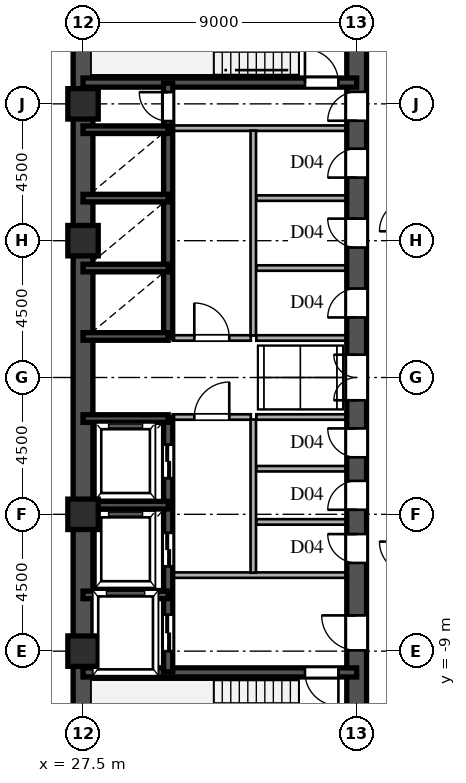
"""IFC4 building model, lengths in metres.
Left out: names, types, materials, properties, quantities, classifications, styles, units other than length and angle.
Written with IfcOpenShell. Run it as: python <this file> out.ifc"""

import sys

from ifc_helpers import new_model, si_unit, direction, frame, frame_2d, origin, origin_2d, place, context, subcontext, project, spatial, rectangle, hollow_rectangle, extrude, source, transform, mapped, element, fill, save


model = new_model("IFC4")
c1 = context("Model", 3, precision=1e-05, world=origin(), true_north=direction((0.0, 1.0)))
c2 = subcontext(c1, "Body", "Model", "MODEL_VIEW")
j1 = project(units=[si_unit("LENGTHUNIT", "METRE"), si_unit("PLANEANGLEUNIT", "RADIAN")], contexts=[c1])
p1 = place(None, origin())
s1 = spatial("IfcSite", under=j1, at=p1, CompositionType="ELEMENT")
p2 = place(p1, origin())
s2 = spatial("IfcBuilding", under=s1, at=p2, CompositionType="ELEMENT")
p3 = place(p2, frame((0.0, 0.0, 80.1)))
s3 = spatial("IfcBuildingStorey", under=s2, at=p3, CompositionType="ELEMENT", Elevation=80.1)
m1 = source(origin(), c2, "Body", "SweptSolid", [
    extrude(hollow_rectangle(XDim=1.0, YDim=1.0, WallThickness=0.042, at=origin_2d()), origin(), (0.0, 0.0, 1.0), 3.6),
])
for number, where, z_axis, x_axis in (
    (1, (27.5, -9.0, 0.0), (0.0, 0.0, 1.0), (1.0, 0.0, 0.0)),
    (2, (27.5, -4.5, 0.0), (0.0, 0.0, 1.0), (1.0, 0.0, 0.0)),
    (3, (27.5, 4.5, 0.0), (0.0, 0.0, 1.0), (1.0, 0.0, 0.0)),
    (4, (27.5, 9.0, 0.0), (0.0, 0.0, 1.0), (1.0, 0.0, 0.0)),
):
    element("IfcColumn", number, at=place(p3, frame(where, z_axis=z_axis, x_axis=x_axis)), inside=s3, PredefinedType="COLUMN", context=c2, shape_type="MappedRepresentation", body=[
        mapped(m1, transform((0.0, 0.0, 0.0), scale=1.0)),
    ])
for number, where, z_axis, x_axis in (
    (5, (27.5, -13.5, 0.0), (0.0, 0.0, 1.0), (0.0, 1.0, 0.0)),
    (6, (27.5, 1.3, 0.0), (0.0, 0.0, 1.0), (0.0, 1.0, 0.0)),
):
    element("IfcWall", number, at=place(p3, frame(where, z_axis=z_axis, x_axis=x_axis)), inside=s3, PredefinedType="SHEAR", context=c2, shape_type="SweptSolid", body=[
        extrude(rectangle(XDim=12.2, YDim=0.65, at=frame_2d((6.1, 0.0))), origin(), (0.0, 0.0, 1.0), 3.38),
    ])
p4 = place(p3, frame((27.5, -1.3, 0.0), z_axis=(0.0, 0.0, 1.0), x_axis=(0.0, 1.0, 0.0)))
e7 = element("IfcWall", 7, at=p4, inside=s3, PredefinedType="SHEAR", context=c2, shape_type="SweptSolid", body=[
    extrude(rectangle(XDim=2.6, YDim=0.65, at=frame_2d((1.3, 0.0))), origin(), (0.0, 0.0, 1.0), 3.38),
])
p5 = place(p3, frame((36.5, -13.65, 0.0), z_axis=(0.0, 0.0, 1.0), x_axis=(0.0, 1.0, 0.0)))
e8 = element("IfcWall", 8, at=p5, inside=s3, PredefinedType="SHEAR", context=c2, shape_type="SweptSolid", body=[
    extrude(rectangle(XDim=7.15, YDim=0.65, at=frame_2d((3.575, 0.0))), origin(), (0.0, 0.0, 1.0), 3.38),
])
p6 = place(p5, frame((4.675, 0.0, 0.0)))
e9 = element("IfcOpeningElement", 9, at=p6, cuts=e8, PredefinedType="OPENING", context=c2, shape_type="SweptSolid", body=[
    extrude(rectangle(XDim=1.15, YDim=2.2, at=frame_2d((0.575, 1.1))), frame((0.0, 0.335, 0.0), z_axis=(0.0, -1.0, 0.0), x_axis=(1.0, 0.0, 0.0)), (0.0, 0.0, 1.0), 0.67),
])
p7 = place(p3, frame((36.5, -1.3, 0.0), z_axis=(0.0, 0.0, 1.0), x_axis=(0.0, 1.0, 0.0)))
e10 = element("IfcWall", 10, at=p7, inside=s3, PredefinedType="SHEAR", context=c2, shape_type="SweptSolid", body=[
    extrude(rectangle(XDim=2.6, YDim=0.65, at=frame_2d((1.3, 0.0))), origin(), (0.0, 0.0, 1.0), 3.38),
])
p8 = place(p7, frame((0.55, 0.0, 0.0)))
e11 = element("IfcOpeningElement", 11, at=p8, cuts=e10, PredefinedType="OPENING", context=c2, shape_type="SweptSolid", body=[
    extrude(rectangle(XDim=1.5, YDim=2.3, at=frame_2d((0.75, 1.15))), frame((0.0, 0.335, 0.0), z_axis=(0.0, -1.0, 0.0), x_axis=(1.0, 0.0, 0.0)), (0.0, 0.0, 1.0), 0.67),
])
p9 = place(p3, frame((36.5, 8.2, 0.0), z_axis=(0.0, 0.0, 1.0), x_axis=(0.0, 1.0, 0.0)))
e12 = element("IfcWall", 12, at=p9, inside=s3, PredefinedType="SHEAR", context=c2, shape_type="SweptSolid", body=[
    extrude(rectangle(XDim=5.45, YDim=0.65, at=frame_2d((2.725, 0.0))), origin(), (0.0, 0.0, 1.0), 3.38),
])
p10 = place(p9, frame((0.245, 0.0, 0.0)))
e13 = element("IfcOpeningElement", 13, at=p10, cuts=e12, PredefinedType="OPENING", context=c2, shape_type="SweptSolid", body=[
    extrude(rectangle(XDim=0.95, YDim=2.15, at=frame_2d((0.475, 1.075))), frame((0.0, 0.335, 0.0), z_axis=(0.0, -1.0, 0.0), x_axis=(1.0, 0.0, 0.0)), (0.0, 0.0, 1.0), 0.67),
])
p11 = place(p3, frame((36.5, -6.5, 0.0), z_axis=(0.0, 0.0, 1.0), x_axis=(0.0, 1.0, 0.0)))
e14 = element("IfcWall", 14, at=p11, inside=s3, PredefinedType="SHEAR", context=c2, shape_type="SweptSolid", body=[
    extrude(rectangle(XDim=1.75, YDim=0.65, at=frame_2d((0.875, 0.0))), origin(), (0.0, 0.0, 1.0), 3.38),
])
p12 = place(p11, frame((0.4, 0.0, 0.0)))
e15 = element("IfcOpeningElement", 15, at=p12, cuts=e14, PredefinedType="OPENING", context=c2, shape_type="SweptSolid", body=[
    extrude(rectangle(XDim=0.95, YDim=2.15, at=frame_2d((0.475, 1.075))), frame((0.0, 0.335, 0.0), z_axis=(0.0, -1.0, 0.0), x_axis=(1.0, 0.0, 0.0)), (0.0, 0.0, 1.0), 0.67),
])
p13 = place(p3, frame((36.5, -4.75, 0.0), z_axis=(0.0, 0.0, 1.0), x_axis=(0.0, 1.0, 0.0)))
e16 = element("IfcWall", 16, at=p13, inside=s3, PredefinedType="SHEAR", context=c2, shape_type="SweptSolid", body=[
    extrude(rectangle(XDim=1.75, YDim=0.65, at=frame_2d((0.875, 0.0))), origin(), (0.0, 0.0, 1.0), 3.38),
])
p14 = place(p13, frame((0.4, 0.0, 0.0)))
e17 = element("IfcOpeningElement", 17, at=p14, cuts=e16, PredefinedType="OPENING", context=c2, shape_type="SweptSolid", body=[
    extrude(rectangle(XDim=0.95, YDim=2.15, at=frame_2d((0.475, 1.075))), frame((0.0, 0.335, 0.0), z_axis=(0.0, -1.0, 0.0), x_axis=(1.0, 0.0, 0.0)), (0.0, 0.0, 1.0), 0.67),
])
p15 = place(p3, frame((36.5, -3.0, 0.0), z_axis=(0.0, 0.0, 1.0), x_axis=(0.0, 1.0, 0.0)))
e18 = element("IfcWall", 18, at=p15, inside=s3, PredefinedType="SHEAR", context=c2, shape_type="SweptSolid", body=[
    extrude(rectangle(XDim=1.7, YDim=0.65, at=frame_2d((0.85, 0.0))), origin(), (0.0, 0.0, 1.0), 3.38),
])
p16 = place(p15, frame((0.375, 0.0, 0.0)))
e19 = element("IfcOpeningElement", 19, at=p16, cuts=e18, PredefinedType="OPENING", context=c2, shape_type="SweptSolid", body=[
    extrude(rectangle(XDim=0.95, YDim=2.15, at=frame_2d((0.475, 1.075))), frame((0.0, 0.335, 0.0), z_axis=(0.0, -1.0, 0.0), x_axis=(1.0, 0.0, 0.0)), (0.0, 0.0, 1.0), 0.67),
])
p17 = place(p3, frame((36.5, 1.3, 0.0), z_axis=(0.0, 0.0, 1.0), x_axis=(0.0, 1.0, 0.0)))
e20 = element("IfcWall", 20, at=p17, inside=s3, PredefinedType="SHEAR", context=c2, shape_type="SweptSolid", body=[
    extrude(rectangle(XDim=2.3, YDim=0.65, at=frame_2d((1.15, 0.0))), origin(), (0.0, 0.0, 1.0), 3.38),
])
p18 = place(p17, frame((0.675, 0.0, 0.0)))
e21 = element("IfcOpeningElement", 21, at=p18, cuts=e20, PredefinedType="OPENING", context=c2, shape_type="SweptSolid", body=[
    extrude(rectangle(XDim=0.95, YDim=2.15, at=frame_2d((0.475, 1.075))), frame((0.0, 0.335, 0.0), z_axis=(0.0, -1.0, 0.0), x_axis=(1.0, 0.0, 0.0)), (0.0, 0.0, 1.0), 0.67),
])
p19 = place(p3, frame((36.5, 3.6, 0.0), z_axis=(0.0, 0.0, 1.0), x_axis=(0.0, 1.0, 0.0)))
e22 = element("IfcWall", 22, at=p19, inside=s3, PredefinedType="SHEAR", context=c2, shape_type="SweptSolid", body=[
    extrude(rectangle(XDim=2.3, YDim=0.65, at=frame_2d((1.15, 0.0))), origin(), (0.0, 0.0, 1.0), 3.38),
])
p20 = place(p19, frame((0.675, 0.0, 0.0)))
e23 = element("IfcOpeningElement", 23, at=p20, cuts=e22, PredefinedType="OPENING", context=c2, shape_type="SweptSolid", body=[
    extrude(rectangle(XDim=0.95, YDim=2.15, at=frame_2d((0.475, 1.075))), frame((0.0, 0.335, 0.0), z_axis=(0.0, -1.0, 0.0), x_axis=(1.0, 0.0, 0.0)), (0.0, 0.0, 1.0), 0.67),
])
p21 = place(p3, frame((36.5, 5.9, 0.0), z_axis=(0.0, 0.0, 1.0), x_axis=(0.0, 1.0, 0.0)))
e24 = element("IfcWall", 24, at=p21, inside=s3, PredefinedType="SHEAR", context=c2, shape_type="SweptSolid", body=[
    extrude(rectangle(XDim=2.3, YDim=0.65, at=frame_2d((1.15, 0.0))), origin(), (0.0, 0.0, 1.0), 3.38),
])
p22 = place(p21, frame((0.675, 0.0, 0.0)))
e25 = element("IfcOpeningElement", 25, at=p22, cuts=e24, PredefinedType="OPENING", context=c2, shape_type="SweptSolid", body=[
    extrude(rectangle(XDim=0.95, YDim=2.15, at=frame_2d((0.475, 1.075))), frame((0.0, 0.335, 0.0), z_axis=(0.0, -1.0, 0.0), x_axis=(1.0, 0.0, 0.0)), (0.0, 0.0, 1.0), 0.67),
])
p23 = place(p3, frame((27.5, -9.7, 0.0), z_axis=(0.0, 0.0, 1.0), x_axis=(1.0, 0.0, 0.0)))
e26 = element("IfcWall", 26, at=p23, inside=s3, PredefinedType="SHEAR", context=c2, shape_type="SweptSolid", body=[
    extrude(rectangle(XDim=9.0, YDim=0.3, at=frame_2d((4.5, 0.0))), origin(), (0.0, 0.0, 1.0), 3.38),
])
p24 = place(p23, frame((7.3, 0.0, 0.0)))
e27 = element("IfcOpeningElement", 27, at=p24, cuts=e26, PredefinedType="OPENING", context=c2, shape_type="SweptSolid", body=[
    extrude(rectangle(XDim=1.1, YDim=2.2, at=frame_2d((0.55, 1.1))), frame((0.0, 0.16, 0.0), z_axis=(0.0, -1.0, 0.0), x_axis=(1.0, 0.0, 0.0)), (0.0, 0.0, 1.0), 0.32),
])
p25 = place(p3, frame((27.5, 9.7, 0.0), z_axis=(0.0, 0.0, 1.0), x_axis=(1.0, 0.0, 0.0)))
e28 = element("IfcWall", 28, at=p25, inside=s3, PredefinedType="SHEAR", context=c2, shape_type="SweptSolid", body=[
    extrude(rectangle(XDim=9.0, YDim=0.3, at=frame_2d((4.5, 0.0))), origin(), (0.0, 0.0, 1.0), 3.38),
])
p26 = place(p25, frame((7.3, 0.0, 0.0)))
e29 = element("IfcOpeningElement", 29, at=p26, cuts=e28, PredefinedType="OPENING", context=c2, shape_type="SweptSolid", body=[
    extrude(rectangle(XDim=1.1, YDim=2.2, at=frame_2d((0.55, 1.1))), frame((0.0, 0.16, 0.0), z_axis=(0.0, -1.0, 0.0), x_axis=(1.0, 0.0, 0.0)), (0.0, 0.0, 1.0), 0.32),
])
for number, where, z_axis, x_axis in (
    (30, (27.5, -7.15, 0.0), (0.0, 0.0, 1.0), (1.0, 0.0, 0.0)),
    (31, (27.5, -4.2, 0.0), (0.0, 0.0, 1.0), (1.0, 0.0, 0.0)),
    (32, (27.5, -1.35, 0.0), (0.0, 0.0, 1.0), (1.0, 0.0, 0.0)),
    (33, (27.5, 1.35, 0.0), (0.0, 0.0, 1.0), (1.0, 0.0, 0.0)),
    (34, (27.5, 3.6, 0.0), (0.0, 0.0, 1.0), (1.0, 0.0, 0.0)),
    (35, (27.5, 5.9, 0.0), (0.0, 0.0, 1.0), (1.0, 0.0, 0.0)),
    (36, (27.5, 8.15, 0.0), (0.0, 0.0, 1.0), (1.0, 0.0, 0.0)),
):
    element("IfcWall", number, at=place(p3, frame(where, z_axis=z_axis, x_axis=x_axis)), inside=s3, PredefinedType="SHEAR", context=c2, shape_type="SweptSolid", body=[
        extrude(rectangle(XDim=2.8, YDim=0.25, at=frame_2d((1.4, 0.0))), origin(), (0.0, 0.0, 1.0), 3.38),
    ])
p27 = place(p3, frame((30.3, -9.68, 0.0), z_axis=(0.0, 0.0, 1.0), x_axis=(0.0, 1.0, 0.0)))
e37 = element("IfcWall", 37, at=p27, inside=s3, PredefinedType="SHEAR", context=c2, shape_type="SweptSolid", body=[
    extrude(rectangle(XDim=2.56, YDim=0.3, at=frame_2d((1.28, 0.0))), origin(), (0.0, 0.0, 1.0), 3.38),
])
p28 = place(p27, frame((0.68, 0.0, 0.0)))
e38 = element("IfcOpeningElement", 38, at=p28, cuts=e37, PredefinedType="OPENING", context=c2, shape_type="SweptSolid", body=[
    extrude(rectangle(XDim=1.2, YDim=2.25, at=frame_2d((0.6, 1.125))), frame((0.0, 0.16, 0.0), z_axis=(0.0, -1.0, 0.0), x_axis=(1.0, 0.0, 0.0)), (0.0, 0.0, 1.0), 0.32),
])
p29 = place(p3, frame((30.3, -7.12, 0.0), z_axis=(0.0, 0.0, 1.0), x_axis=(0.0, 1.0, 0.0)))
e39 = element("IfcWall", 39, at=p29, inside=s3, PredefinedType="SHEAR", context=c2, shape_type="SweptSolid", body=[
    extrude(rectangle(XDim=2.92, YDim=0.3, at=frame_2d((1.46, 0.0))), origin(), (0.0, 0.0, 1.0), 3.38),
])
p30 = place(p29, frame((0.91, 0.0, 0.0)))
e40 = element("IfcOpeningElement", 40, at=p30, cuts=e39, PredefinedType="OPENING", context=c2, shape_type="SweptSolid", body=[
    extrude(rectangle(XDim=1.1, YDim=2.2, at=frame_2d((0.55, 1.1))), frame((0.0, 0.16, 0.0), z_axis=(0.0, -1.0, 0.0), x_axis=(1.0, 0.0, 0.0)), (0.0, 0.0, 1.0), 0.32),
])
p31 = place(p3, frame((30.3, -4.2, 0.0), z_axis=(0.0, 0.0, 1.0), x_axis=(0.0, 1.0, 0.0)))
e41 = element("IfcWall", 41, at=p31, inside=s3, PredefinedType="SHEAR", context=c2, shape_type="SweptSolid", body=[
    extrude(rectangle(XDim=2.88, YDim=0.3, at=frame_2d((1.44, 0.0))), origin(), (0.0, 0.0, 1.0), 3.38),
])
p32 = place(p31, frame((0.89, 0.0, 0.0)))
e42 = element("IfcOpeningElement", 42, at=p32, cuts=e41, PredefinedType="OPENING", context=c2, shape_type="SweptSolid", body=[
    extrude(rectangle(XDim=1.1, YDim=2.2, at=frame_2d((0.55, 1.1))), frame((0.0, 0.16, 0.0), z_axis=(0.0, -1.0, 0.0), x_axis=(1.0, 0.0, 0.0)), (0.0, 0.0, 1.0), 0.32),
])
p33 = place(p3, frame((30.3, 1.32, 0.0), z_axis=(0.0, 0.0, 1.0), x_axis=(0.0, 1.0, 0.0)))
e43 = element("IfcWall", 43, at=p33, inside=s3, PredefinedType="SHEAR", context=c2, shape_type="SweptSolid", body=[
    extrude(rectangle(XDim=2.28, YDim=0.3, at=frame_2d((1.14, 0.0))), origin(), (0.0, 0.0, 1.0), 3.38),
])
p34 = place(p3, frame((30.3, 3.6, 0.0), z_axis=(0.0, 0.0, 1.0), x_axis=(0.0, 1.0, 0.0)))
e44 = element("IfcWall", 44, at=p34, inside=s3, PredefinedType="SHEAR", context=c2, shape_type="SweptSolid", body=[
    extrude(rectangle(XDim=2.3, YDim=0.3, at=frame_2d((1.15, 0.0))), origin(), (0.0, 0.0, 1.0), 3.38),
])
p35 = place(p3, frame((30.3, 5.9, 0.0), z_axis=(0.0, 0.0, 1.0), x_axis=(0.0, 1.0, 0.0)))
e45 = element("IfcWall", 45, at=p35, inside=s3, PredefinedType="SHEAR", context=c2, shape_type="SweptSolid", body=[
    extrude(rectangle(XDim=2.25, YDim=0.3, at=frame_2d((1.125, 0.0))), origin(), (0.0, 0.0, 1.0), 3.38),
])
p36 = place(p3, frame((30.3, 8.15, 0.0), z_axis=(0.0, 0.0, 1.0), x_axis=(0.0, 1.0, 0.0)))
e46 = element("IfcWall", 46, at=p36, inside=s3, PredefinedType="SHEAR", context=c2, shape_type="SweptSolid", body=[
    extrude(rectangle(XDim=1.53, YDim=0.3, at=frame_2d((0.765, 0.0))), origin(), (0.0, 0.0, 1.0), 3.38),
])
p37 = place(p36, frame((0.285, 0.0, 0.0)))
e47 = element("IfcOpeningElement", 47, at=p37, cuts=e46, PredefinedType="OPENING", context=c2, shape_type="SweptSolid", body=[
    extrude(rectangle(XDim=0.95, YDim=2.15, at=frame_2d((0.475, 1.075))), frame((0.0, 0.16, 0.0), z_axis=(0.0, -1.0, 0.0), x_axis=(1.0, 0.0, 0.0)), (0.0, 0.0, 1.0), 0.32),
])
for number, where, z_axis, x_axis in (
    (48, (30.45, -6.5, 0.0), (0.0, 0.0, 1.0), (1.0, 0.0, 0.0)),
    (49, (30.45, 8.2, 0.0), (0.0, 0.0, 1.0), (1.0, 0.0, 0.0)),
):
    element("IfcWall", number, at=place(p3, frame(where, z_axis=z_axis, x_axis=x_axis)), inside=s3, PredefinedType="PARTITIONING", context=c2, shape_type="SweptSolid", body=[
        extrude(rectangle(XDim=5.7, YDim=0.18, at=frame_2d((2.85, 0.0))), origin(), (0.0, 0.0, 1.0), 3.38),
    ])
p38 = place(p3, frame((33.1, -6.42, 0.0), z_axis=(0.0, 0.0, 1.0), x_axis=(0.0, 1.0, 0.0)))
e50 = element("IfcWall", 50, at=p38, inside=s3, PredefinedType="PARTITIONING", context=c2, shape_type="SweptSolid", body=[
    extrude(rectangle(XDim=5.04, YDim=0.18, at=frame_2d((2.52, 0.0))), origin(), (0.0, 0.0, 1.0), 3.38),
])
p39 = place(p3, frame((33.1, 1.38, 0.0), z_axis=(0.0, 0.0, 1.0), x_axis=(0.0, 1.0, 0.0)))
e51 = element("IfcWall", 51, at=p39, inside=s3, PredefinedType="PARTITIONING", context=c2, shape_type="SweptSolid", body=[
    extrude(rectangle(XDim=6.74, YDim=0.18, at=frame_2d((3.37, 0.0))), origin(), (0.0, 0.0, 1.0), 3.38),
])
p40 = place(p3, frame((30.45, -1.3, 0.0), z_axis=(0.0, 0.0, 1.0), x_axis=(1.0, 0.0, 0.0)))
e52 = element("IfcWall", 52, at=p40, inside=s3, PredefinedType="PARTITIONING", context=c2, shape_type="SweptSolid", body=[
    extrude(rectangle(XDim=2.57, YDim=0.18, at=frame_2d((1.285, 0.0))), origin(), (0.0, 0.0, 1.0), 3.38),
])
p41 = place(p40, frame((0.71, 0.0, 0.0)))
e53 = element("IfcOpeningElement", 53, at=p41, cuts=e52, PredefinedType="OPENING", context=c2, shape_type="SweptSolid", body=[
    extrude(rectangle(XDim=1.15, YDim=2.2, at=frame_2d((0.575, 1.1))), frame((0.0, 0.1, 0.0), z_axis=(0.0, -1.0, 0.0), x_axis=(1.0, 0.0, 0.0)), (0.0, 0.0, 1.0), 0.2),
])
p42 = place(p3, frame((30.45, 1.3, 0.0), z_axis=(0.0, 0.0, 1.0), x_axis=(1.0, 0.0, 0.0)))
e54 = element("IfcWall", 54, at=p42, inside=s3, PredefinedType="PARTITIONING", context=c2, shape_type="SweptSolid", body=[
    extrude(rectangle(XDim=2.57, YDim=0.18, at=frame_2d((1.285, 0.0))), origin(), (0.0, 0.0, 1.0), 3.38),
])
p43 = place(p42, frame((0.71, 0.0, 0.0)))
e55 = element("IfcOpeningElement", 55, at=p43, cuts=e54, PredefinedType="OPENING", context=c2, shape_type="SweptSolid", body=[
    extrude(rectangle(XDim=1.15, YDim=2.2, at=frame_2d((0.575, 1.1))), frame((0.0, 0.1, 0.0), z_axis=(0.0, -1.0, 0.0), x_axis=(1.0, 0.0, 0.0)), (0.0, 0.0, 1.0), 0.2),
])
for number, where, z_axis, x_axis in (
    (56, (33.2, -1.3, 0.0), (0.0, 0.0, 1.0), (1.0, 0.0, 0.0)),
    (57, (33.2, 1.3, 0.0), (0.0, 0.0, 1.0), (1.0, 0.0, 0.0)),
    (58, (33.2, -4.75, 0.0), (0.0, 0.0, 1.0), (1.0, 0.0, 0.0)),
    (59, (33.2, -3.0, 0.0), (0.0, 0.0, 1.0), (1.0, 0.0, 0.0)),
    (60, (33.2, 3.6, 0.0), (0.0, 0.0, 1.0), (1.0, 0.0, 0.0)),
    (61, (33.2, 5.9, 0.0), (0.0, 0.0, 1.0), (1.0, 0.0, 0.0)),
):
    element("IfcWall", number, at=place(p3, frame(where, z_axis=z_axis, x_axis=x_axis)), inside=s3, PredefinedType="PARTITIONING", context=c2, shape_type="SweptSolid", body=[
        extrude(rectangle(XDim=2.95, YDim=0.18, at=frame_2d((1.475, 0.0))), origin(), (0.0, 0.0, 1.0), 3.38),
    ])
m2 = source(origin(), c2, "Body", "SweptSolid", [
    extrude(rectangle(XDim=1.15, YDim=2.2, at=frame_2d((0.575, 1.1))), frame((0.0, 0.025, 0.0), z_axis=(0.0, -1.0, 0.0), x_axis=(1.0, 0.0, 0.0)), (0.0, 0.0, 1.0), 0.05),
])
p44 = place(p6, origin())
e62 = element("IfcDoor", 62, at=p44, inside=s3, OperationType="SINGLE_SWING_RIGHT", PredefinedType="DOOR", context=c2, shape_type="MappedRepresentation", body=[
    mapped(m2, transform((0.0, 0.0, 0.0), scale=1.0)),
])
fill(e9, e62)
m3 = source(origin(), c2, "Body", "SweptSolid", [
    extrude(rectangle(XDim=1.5, YDim=2.3, at=frame_2d((0.75, 1.15))), frame((0.0, 0.025, 0.0), z_axis=(0.0, -1.0, 0.0), x_axis=(1.0, 0.0, 0.0)), (0.0, 0.0, 1.0), 0.05),
])
p45 = place(p8, origin())
e63 = element("IfcDoor", 63, at=p45, inside=s3, OperationType="DOUBLE_SWING_LEFT", PredefinedType="DOOR", context=c2, shape_type="MappedRepresentation", body=[
    mapped(m3, transform((0.0, 0.0, 0.0), scale=1.0)),
])
fill(e11, e63)
m4 = source(origin(), c2, "Body", "SweptSolid", [
    extrude(rectangle(XDim=0.95, YDim=2.15, at=frame_2d((0.475, 1.075))), frame((0.0, 0.025, 0.0), z_axis=(0.0, -1.0, 0.0), x_axis=(1.0, 0.0, 0.0)), (0.0, 0.0, 1.0), 0.05),
])
p46 = place(p10, origin())
e64 = element("IfcDoor", 64, at=p46, inside=s3, OperationType="SINGLE_SWING_LEFT", PredefinedType="DOOR", context=c2, shape_type="MappedRepresentation", body=[
    mapped(m4, transform((0.0, 0.0, 0.0), scale=1.0)),
])
fill(e13, e64)
p47 = place(p12, origin())
e65 = element("IfcDoor", 65, at=p47, inside=s3, OperationType="SINGLE_SWING_RIGHT", PredefinedType="DOOR", context=c2, shape_type="MappedRepresentation", body=[
    mapped(m4, transform((0.0, 0.0, 0.0), scale=1.0)),
])
fill(e15, e65)
p48 = place(p14, origin())
e66 = element("IfcDoor", 66, at=p48, inside=s3, OperationType="SINGLE_SWING_LEFT", PredefinedType="DOOR", context=c2, shape_type="MappedRepresentation", body=[
    mapped(m4, transform((0.0, 0.0, 0.0), scale=1.0)),
])
fill(e17, e66)
p49 = place(p16, origin())
e67 = element("IfcDoor", 67, at=p49, inside=s3, OperationType="SINGLE_SWING_RIGHT", PredefinedType="DOOR", context=c2, shape_type="MappedRepresentation", body=[
    mapped(m4, transform((0.0, 0.0, 0.0), scale=1.0)),
])
fill(e19, e67)
p50 = place(p18, origin())
e68 = element("IfcDoor", 68, at=p50, inside=s3, OperationType="SINGLE_SWING_LEFT", PredefinedType="DOOR", context=c2, shape_type="MappedRepresentation", body=[
    mapped(m4, transform((0.0, 0.0, 0.0), scale=1.0)),
])
fill(e21, e68)
p51 = place(p20, origin())
e69 = element("IfcDoor", 69, at=p51, inside=s3, OperationType="SINGLE_SWING_RIGHT", PredefinedType="DOOR", context=c2, shape_type="MappedRepresentation", body=[
    mapped(m4, transform((0.0, 0.0, 0.0), scale=1.0)),
])
fill(e23, e69)
p52 = place(p22, origin())
e70 = element("IfcDoor", 70, at=p52, inside=s3, OperationType="SINGLE_SWING_LEFT", PredefinedType="DOOR", context=c2, shape_type="MappedRepresentation", body=[
    mapped(m4, transform((0.0, 0.0, 0.0), scale=1.0)),
])
fill(e25, e70)
m5 = source(origin(), c2, "Body", "SweptSolid", [
    extrude(rectangle(XDim=1.1, YDim=2.2, at=frame_2d((0.55, 1.1))), frame((0.0, 0.025, 0.0), z_axis=(0.0, -1.0, 0.0), x_axis=(1.0, 0.0, 0.0)), (0.0, 0.0, 1.0), 0.05),
])
p53 = place(p24, frame((1.1, 0.0, 0.0), z_axis=(0.0, 0.0, 1.0), x_axis=(-1.0, 0.0, 0.0)))
e71 = element("IfcDoor", 71, at=p53, inside=s3, OperationType="SINGLE_SWING_RIGHT", PredefinedType="DOOR", context=c2, shape_type="MappedRepresentation", body=[
    mapped(m5, transform((0.0, 0.0, 0.0), scale=1.0)),
])
fill(e27, e71)
p54 = place(p26, origin())
e72 = element("IfcDoor", 72, at=p54, inside=s3, OperationType="SINGLE_SWING_LEFT", PredefinedType="DOOR", context=c2, shape_type="MappedRepresentation", body=[
    mapped(m5, transform((0.0, 0.0, 0.0), scale=1.0)),
])
fill(e29, e72)
m6 = source(origin(), c2, "Body", "SweptSolid", [
    extrude(rectangle(XDim=1.2, YDim=2.25, at=frame_2d((0.6, 1.125))), frame((0.0, 0.025, 0.0), z_axis=(0.0, -1.0, 0.0), x_axis=(1.0, 0.0, 0.0)), (0.0, 0.0, 1.0), 0.05),
])
p55 = place(p28, origin())
e73 = element("IfcDoor", 73, at=p55, inside=s3, OperationType="DOUBLE_DOOR_SLIDING", PredefinedType="DOOR", context=c2, shape_type="MappedRepresentation", body=[
    mapped(m6, transform((0.0, 0.0, 0.0), scale=1.0)),
])
fill(e38, e73)
m7 = source(origin(), c2, "Body", "SweptSolid", [
    extrude(rectangle(XDim=1.1, YDim=2.2, at=frame_2d((0.55, 1.1))), frame((0.0, 0.025, 0.0), z_axis=(0.0, -1.0, 0.0), x_axis=(1.0, 0.0, 0.0)), (0.0, 0.0, 1.0), 0.05),
])
p56 = place(p30, origin())
e74 = element("IfcDoor", 74, at=p56, inside=s3, OperationType="DOUBLE_DOOR_SLIDING", PredefinedType="DOOR", context=c2, shape_type="MappedRepresentation", body=[
    mapped(m7, transform((0.0, 0.0, 0.0), scale=1.0)),
])
fill(e40, e74)
p57 = place(p32, origin())
e75 = element("IfcDoor", 75, at=p57, inside=s3, OperationType="DOUBLE_DOOR_SLIDING", PredefinedType="DOOR", context=c2, shape_type="MappedRepresentation", body=[
    mapped(m7, transform((0.0, 0.0, 0.0), scale=1.0)),
])
fill(e42, e75)
p58 = place(p37, origin())
e76 = element("IfcDoor", 76, at=p58, inside=s3, OperationType="SINGLE_SWING_RIGHT", PredefinedType="DOOR", context=c2, shape_type="MappedRepresentation", body=[
    mapped(m4, transform((0.0, 0.0, 0.0), scale=1.0)),
])
fill(e47, e76)
p59 = place(p41, origin())
e77 = element("IfcDoor", 77, at=p59, inside=s3, OperationType="SINGLE_SWING_RIGHT", PredefinedType="DOOR", context=c2, shape_type="MappedRepresentation", body=[
    mapped(m2, transform((0.0, 0.0, 0.0), scale=1.0)),
])
fill(e53, e77)
p60 = place(p43, origin())
e78 = element("IfcDoor", 78, at=p60, inside=s3, OperationType="SINGLE_SWING_LEFT", PredefinedType="DOOR", context=c2, shape_type="MappedRepresentation", body=[
    mapped(m2, transform((0.0, 0.0, 0.0), scale=1.0)),
])
fill(e55, e78)
save(model, sys.argv[1])
